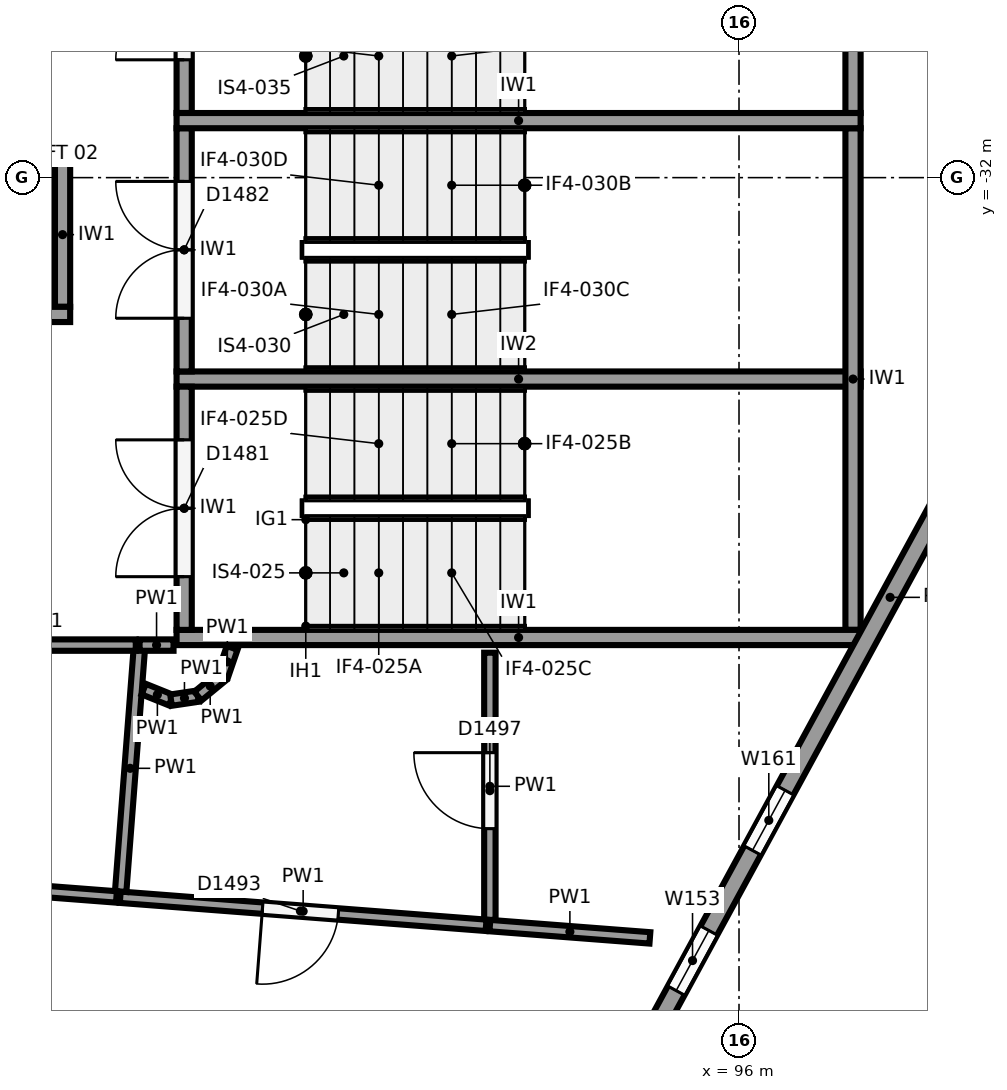
"""IFC4 building model, lengths in metres.
Left out: names, types, materials, properties, quantities, classifications, styles, units other than length and angle.
Written with IfcOpenShell. Run it as: python <this file> out.ifc"""

import sys

from ifc_helpers import new_model, si_unit, direction, frame, frame_2d, origin, place, context, subcontext, project, spatial, rectangle, extrude, element, fill, save


model = new_model("IFC4")
c1 = context("Model", 3, precision=1e-05, world=origin(), true_north=direction((0.0, 1.0)))
c2 = subcontext(c1, "Body", "Model", "MODEL_VIEW")
j1 = project(units=[si_unit("LENGTHUNIT", "METRE"), si_unit("PLANEANGLEUNIT", "RADIAN")], contexts=[c1])
p1 = place(None, origin())
s1 = spatial("IfcSite", under=j1, at=p1, CompositionType="ELEMENT")
p2 = place(p1, origin())
s2 = spatial("IfcBuilding", under=s1, at=p2, CompositionType="ELEMENT")
p3 = place(p2, frame((0.0, 0.0, 18.0)))
s3 = spatial("IfcBuildingStorey", under=s2, at=p3, CompositionType="ELEMENT", Elevation=18.0)
p4 = place(p3, frame((101.161, -31.689, 0.0), z_axis=(0.0, 0.0, 1.0), x_axis=(-0.477867771117, -0.878431780691, 0.0)))
e1 = element("IfcWall", 1, at=p4, inside=s3, PredefinedType="SOLIDWALL", context=c2, shape_type="SweptSolid", body=[
    extrude(rectangle(XDim=13.28, YDim=0.25, at=frame_2d((6.64, 0.0))), origin(), (0.0, 0.0, 1.0), 4.3),
])
p5 = place(p4, frame((11.63, 0.0, 1.0)))
e2 = element("IfcOpeningElement", 2, at=p5, cuts=e1, PredefinedType="OPENING", context=c2, shape_type="SweptSolid", body=[
    extrude(rectangle(XDim=0.9, YDim=3.25, at=frame_2d((0.45, 1.625))), frame((0.0, 0.135, 0.0), z_axis=(0.0, -1.0, 0.0), x_axis=(1.0, 0.0, 0.0)), (0.0, 0.0, 1.0), 0.27),
])
p6 = place(p4, frame((9.53, 0.0, 1.0)))
e3 = element("IfcOpeningElement", 3, at=p6, cuts=e1, PredefinedType="OPENING", context=c2, shape_type="SweptSolid", body=[
    extrude(rectangle(XDim=0.9, YDim=3.25, at=frame_2d((0.45, 1.625))), frame((0.0, 0.135, 0.0), z_axis=(0.0, -1.0, 0.0), x_axis=(1.0, 0.0, 0.0)), (0.0, 0.0, 1.0), 0.27),
])
p7 = place(p4, frame((1.13, 0.0, 1.0)))
e4 = element("IfcOpeningElement", 4, at=p7, cuts=e1, PredefinedType="OPENING", context=c2, shape_type="SweptSolid", body=[
    extrude(rectangle(XDim=0.9, YDim=3.25, at=frame_2d((0.45, 1.625))), frame((0.0, 0.135, 0.0), z_axis=(0.0, -1.0, 0.0), x_axis=(1.0, 0.0, 0.0)), (0.0, 0.0, 1.0), 0.27),
])
p8 = place(p3, frame((94.815, -19.145, 0.0), z_axis=(0.0, 0.0, 1.0), x_axis=(0.477867771117, -0.878431780691, 0.0)))
e5 = element("IfcWall", 5, at=p8, inside=s3, PredefinedType="SOLIDWALL", context=c2, shape_type="SweptSolid", body=[
    extrude(rectangle(XDim=13.28, YDim=0.25, at=frame_2d((6.64, 0.0))), origin(), (0.0, 0.0, 1.0), 4.3),
])
p9 = place(p8, frame((0.75, 0.0, 1.0)))
e6 = element("IfcOpeningElement", 6, at=p9, cuts=e5, PredefinedType="OPENING", context=c2, shape_type="SweptSolid", body=[
    extrude(rectangle(XDim=0.9, YDim=3.25, at=frame_2d((0.45, 1.625))), frame((0.0, 0.135, 0.0), z_axis=(0.0, -1.0, 0.0), x_axis=(1.0, 0.0, 0.0)), (0.0, 0.0, 1.0), 0.27),
])
p10 = place(p8, frame((2.85, 0.0, 1.0)))
e7 = element("IfcOpeningElement", 7, at=p10, cuts=e5, PredefinedType="OPENING", context=c2, shape_type="SweptSolid", body=[
    extrude(rectangle(XDim=0.9, YDim=3.25, at=frame_2d((0.45, 1.625))), frame((0.0, 0.135, 0.0), z_axis=(0.0, -1.0, 0.0), x_axis=(1.0, 0.0, 0.0)), (0.0, 0.0, 1.0), 0.27),
])
p11 = place(p8, frame((11.25, 0.0, 1.0)))
e8 = element("IfcOpeningElement", 8, at=p11, cuts=e5, PredefinedType="OPENING", context=c2, shape_type="SweptSolid", body=[
    extrude(rectangle(XDim=0.9, YDim=3.25, at=frame_2d((0.45, 1.625))), frame((0.0, 0.135, 0.0), z_axis=(0.0, -1.0, 0.0), x_axis=(1.0, 0.0, 0.0)), (0.0, 0.0, 1.0), 0.27),
])
for number, where, z_axis, x_axis in (
    (9, (97.6, -38.05, 0.0), (0.0, 0.0, 1.0), (-1.0, 0.0, 0.0)),
    (10, (97.6, -31.25, 0.0), (0.0, 0.0, 1.0), (-1.0, 0.0, 0.0)),
):
    element("IfcWall", number, at=place(p3, frame(where, z_axis=z_axis, x_axis=x_axis)), inside=s3, PredefinedType="SHEAR", context=c2, shape_type="SweptSolid", body=[
        extrude(rectangle(XDim=9.0, YDim=0.2, at=frame_2d((4.5, 0.0))), origin(), (0.0, 0.0, 1.0), 5.6),
    ])
for number, where, z_axis, x_axis in (
    (11, (97.5, -37.95, 0.0), (0.0, 0.0, 1.0), (0.0, 1.0, 0.0)),
    (12, (97.5, -31.15, 0.0), (0.0, 0.0, 1.0), (0.0, 1.0, 0.0)),
):
    element("IfcWall", number, at=place(p3, frame(where, z_axis=z_axis, x_axis=x_axis)), inside=s3, PredefinedType="SHEAR", context=c2, shape_type="SweptSolid", body=[
        extrude(rectangle(XDim=6.6, YDim=0.2, at=frame_2d((3.3, 0.0))), origin(), (0.0, 0.0, 1.0), 5.6),
    ])
p12 = place(p3, frame((97.6, -34.65, 0.0), z_axis=(0.0, 0.0, 1.0), x_axis=(-1.0, 0.0, 0.0)))
e13 = element("IfcWall", 13, at=p12, inside=s3, PredefinedType="SHEAR", context=c2, shape_type="SweptSolid", body=[
    extrude(rectangle(XDim=9.0, YDim=0.2, at=frame_2d((4.5, 0.0))), origin(), (0.0, 0.0, 1.0), 5.6),
])
p13 = place(p3, frame((88.7, -37.95, 0.0), z_axis=(0.0, 0.0, 1.0), x_axis=(0.0, 1.0, 0.0)))
e14 = element("IfcWall", 14, at=p13, inside=s3, PredefinedType="SHEAR", context=c2, shape_type="SweptSolid", body=[
    extrude(rectangle(XDim=3.2, YDim=0.2, at=frame_2d((1.6, 0.0))), origin(), (0.0, 0.0, 1.0), 5.6),
])
p14 = place(p13, frame((0.7, 0.0, 0.0)))
e15 = element("IfcOpeningElement", 15, at=p14, cuts=e14, PredefinedType="OPENING", context=c2, shape_type="SweptSolid", body=[
    extrude(rectangle(XDim=1.8, YDim=2.1, at=frame_2d((0.9, 1.05))), frame((0.0, 0.11, 0.0), z_axis=(0.0, -1.0, 0.0), x_axis=(1.0, 0.0, 0.0)), (0.0, 0.0, 1.0), 0.22),
])
p15 = place(p3, frame((88.7, -34.55, 0.0), z_axis=(0.0, 0.0, 1.0), x_axis=(0.0, 1.0, 0.0)))
e16 = element("IfcWall", 16, at=p15, inside=s3, PredefinedType="SHEAR", context=c2, shape_type="SweptSolid", body=[
    extrude(rectangle(XDim=3.2, YDim=0.2, at=frame_2d((1.6, 0.0))), origin(), (0.0, 0.0, 1.0), 5.6),
])
p16 = place(p15, frame((0.7, 0.0, 0.0)))
e17 = element("IfcOpeningElement", 17, at=p16, cuts=e16, PredefinedType="OPENING", context=c2, shape_type="SweptSolid", body=[
    extrude(rectangle(XDim=1.8, YDim=2.1, at=frame_2d((0.9, 1.05))), frame((0.0, 0.11, 0.0), z_axis=(0.0, -1.0, 0.0), x_axis=(1.0, 0.0, 0.0)), (0.0, 0.0, 1.0), 0.22),
])
p17 = place(p3, frame((88.7, -31.15, 0.0), z_axis=(0.0, 0.0, 1.0), x_axis=(0.0, 1.0, 0.0)))
e18 = element("IfcWall", 18, at=p17, inside=s3, PredefinedType="SHEAR", context=c2, shape_type="SweptSolid", body=[
    extrude(rectangle(XDim=3.2, YDim=0.2, at=frame_2d((1.6, 0.0))), origin(), (0.0, 0.0, 1.0), 5.6),
])
p18 = place(p17, frame((0.7, 0.0, 0.0)))
e19 = element("IfcOpeningElement", 19, at=p18, cuts=e18, PredefinedType="OPENING", context=c2, shape_type="SweptSolid", body=[
    extrude(rectangle(XDim=1.8, YDim=2.1, at=frame_2d((0.9, 1.05))), frame((0.0, 0.11, 0.0), z_axis=(0.0, -1.0, 0.0), x_axis=(1.0, 0.0, 0.0)), (0.0, 0.0, 1.0), 0.22),
])
for number, where, z_axis, x_axis in (
    (20, (87.2, -33.8, 0.0), (0.0, 0.0, 1.0), (-1.0, 0.0, 0.0)),
    (21, (87.2, -31.7, 0.0), (0.0, 0.0, 1.0), (-1.0, 0.0, 0.0)),
):
    element("IfcWall", number, at=place(p3, frame(where, z_axis=z_axis, x_axis=x_axis)), inside=s3, PredefinedType="SHEAR", context=c2, shape_type="SweptSolid", body=[
        extrude(rectangle(XDim=3.0, YDim=0.2, at=frame_2d((1.5, 0.0))), origin(), (0.0, 0.0, 1.0), 5.6),
    ])
p19 = place(p3, frame((87.1, -33.7, 0.0), z_axis=(0.0, 0.0, 1.0), x_axis=(0.0, 1.0, 0.0)))
e22 = element("IfcWall", 22, at=p19, inside=s3, PredefinedType="SHEAR", context=c2, shape_type="SweptSolid", body=[
    extrude(rectangle(XDim=1.9, YDim=0.2, at=frame_2d((0.95, 0.0))), origin(), (0.0, 0.0, 1.0), 5.6),
])
p20 = place(p3, frame((94.828, -42.002, 0.0), z_axis=(0.0, 0.0, 1.0), x_axis=(-0.997066714426, 0.076537356789, 0.0)))
e23 = element("IfcWall", 23, at=p20, inside=s3, PredefinedType="PARTITIONING", context=c2, shape_type="SweptSolid", body=[
    extrude(rectangle(XDim=2.112, YDim=0.15, at=frame_2d((1.056, 0.0))), origin(), (0.0, 0.0, 1.0), 5.6),
])
p21 = place(p3, frame((92.722, -41.765, 0.0), z_axis=(0.0, 0.0, 1.0), x_axis=(0.0, 1.0, 0.0)))
e24 = element("IfcWall", 24, at=p21, inside=s3, PredefinedType="PARTITIONING", context=c2, shape_type="SweptSolid", body=[
    extrude(rectangle(XDim=3.515, YDim=0.15, at=frame_2d((1.758, 0.0))), origin(), (0.0, 0.0, 1.0), 5.6),
])
p22 = place(p21, frame((1.2, 0.0, 0.0)))
e25 = element("IfcOpeningElement", 25, at=p22, cuts=e24, PredefinedType="OPENING", context=c2, shape_type="SweptSolid", body=[
    extrude(rectangle(XDim=1.0, YDim=2.1, at=frame_2d((0.5, 1.05))), frame((0.0, 0.085, 0.0), z_axis=(0.0, -1.0, 0.0), x_axis=(1.0, 0.0, 0.0)), (0.0, 0.0, 1.0), 0.17),
])
p23 = place(p3, frame((92.672, -41.837, 0.0), z_axis=(0.0, 0.0, 1.0), x_axis=(-0.997068154384, 0.07651859587, 0.0)))
e26 = element("IfcWall", 26, at=p23, inside=s3, PredefinedType="PARTITIONING", context=c2, shape_type="SweptSolid", body=[
    extrude(rectangle(XDim=4.827, YDim=0.15, at=frame_2d((2.414, 0.0))), origin(), (0.0, 0.0, 1.0), 5.6),
])
p24 = place(p23, frame((1.95, 0.0, 0.0)))
e27 = element("IfcOpeningElement", 27, at=p24, cuts=e26, PredefinedType="OPENING", context=c2, shape_type="SweptSolid", body=[
    extrude(rectangle(XDim=1.0, YDim=2.1, at=frame_2d((0.5, 1.05))), frame((0.0, 0.085, 0.0), z_axis=(0.0, -1.0, 0.0), x_axis=(1.0, 0.0, 0.0)), (0.0, 0.0, 1.0), 0.17),
])
p25 = place(p3, frame((87.865, -41.392, 0.0), z_axis=(0.0, 0.0, 1.0), x_axis=(0.076501302727, 0.997069481371, 0.0)))
e28 = element("IfcWall", 28, at=p25, inside=s3, PredefinedType="PARTITIONING", context=c2, shape_type="SweptSolid", body=[
    extrude(rectangle(XDim=3.252, YDim=0.15, at=frame_2d((1.626, 0.0))), origin(), (0.0, 0.0, 1.0), 5.6),
])
p26 = place(p3, frame((88.113, -38.15, 0.0), z_axis=(0.0, 0.0, 1.0), x_axis=(1.0, 0.0, 0.0)))
e29 = element("IfcWall", 29, at=p26, inside=s3, PredefinedType="PARTITIONING", context=c2, shape_type="SweptSolid", body=[
    extrude(rectangle(XDim=0.447, YDim=0.15, at=frame_2d((0.223, 0.0))), origin(), (0.0, 0.0, 1.0), 5.6),
])
p27 = place(p3, frame((87.809, -41.463, 0.0), z_axis=(0.0, 0.0, 1.0), x_axis=(-0.997068127428, 0.076518947109, 0.0)))
e30 = element("IfcWall", 30, at=p27, inside=s3, PredefinedType="PARTITIONING", context=c2, shape_type="SweptSolid", body=[
    extrude(rectangle(XDim=2.418, YDim=0.15, at=frame_2d((1.209, 0.0))), origin(), (0.0, 0.0, 1.0), 5.6),
])
p28 = place(p3, frame((85.577, -38.15, 0.0), z_axis=(0.0, 0.0, 1.0), x_axis=(1.0, 0.0, 0.0)))
e31 = element("IfcWall", 31, at=p28, inside=s3, PredefinedType="PARTITIONING", context=c2, shape_type="SweptSolid", body=[
    extrude(rectangle(XDim=2.486, YDim=0.15, at=frame_2d((1.243, 0.0))), origin(), (0.0, 0.0, 1.0), 5.6),
])
p29 = place(p3, frame((88.168, -38.729, 0.0), z_axis=(0.0, 0.0, 1.0), x_axis=(0.927779575936, -0.373128742496, 0.0)))
e32 = element("IfcWall", 32, at=p29, inside=s3, PredefinedType="PARTITIONING", context=c2, shape_type="SweptSolid", body=[
    extrude(rectangle(XDim=0.387, YDim=0.15, at=frame_2d((0.194, 0.0))), origin(), (0.0, 0.0, 1.0), 5.6),
])
p30 = place(p3, frame((88.527, -38.874, 0.0), z_axis=(0.0, 0.0, 1.0), x_axis=(0.989140978774, 0.146969806798, 0.0)))
e33 = element("IfcWall", 33, at=p30, inside=s3, PredefinedType="PARTITIONING", context=c2, shape_type="SweptSolid", body=[
    extrude(rectangle(XDim=0.357, YDim=0.15, at=frame_2d((0.179, 0.0))), origin(), (0.0, 0.0, 1.0), 5.6),
])
p31 = place(p3, frame((88.88, -38.822, 0.0), z_axis=(0.0, 0.0, 1.0), x_axis=(0.773256370555, 0.634093514709, 0.0)))
e34 = element("IfcWall", 34, at=p31, inside=s3, PredefinedType="PARTITIONING", context=c2, shape_type="SweptSolid", body=[
    extrude(rectangle(XDim=0.419, YDim=0.15, at=frame_2d((0.209, 0.0))), origin(), (0.0, 0.0, 1.0), 5.6),
])
p32 = place(p3, frame((89.205, -38.556, 0.0), z_axis=(0.0, 0.0, 1.0), x_axis=(0.325219597367, 0.945638521576, 0.0)))
e35 = element("IfcWall", 35, at=p32, inside=s3, PredefinedType="PARTITIONING", context=c2, shape_type="SweptSolid", body=[
    extrude(rectangle(XDim=0.39, YDim=0.15, at=frame_2d((0.195, 0.0))), origin(), (0.0, 0.0, 1.0), 5.6),
])
p33 = place(p5, origin())
e36 = element("IfcWindow", 36, at=p33, inside=s3, PartitioningType="SINGLE_PANEL", PredefinedType="WINDOW", context=c2, shape_type="SweptSolid", body=[
    extrude(rectangle(XDim=0.9, YDim=3.25, at=frame_2d((0.45, 1.625))), frame((0.0, 0.03, 0.0), z_axis=(0.0, -1.0, 0.0), x_axis=(1.0, 0.0, 0.0)), (0.0, 0.0, 1.0), 0.06),
])
fill(e2, e36)
p34 = place(p6, origin())
e37 = element("IfcWindow", 37, at=p34, inside=s3, PartitioningType="SINGLE_PANEL", PredefinedType="WINDOW", context=c2, shape_type="SweptSolid", body=[
    extrude(rectangle(XDim=0.9, YDim=3.25, at=frame_2d((0.45, 1.625))), frame((0.0, 0.03, 0.0), z_axis=(0.0, -1.0, 0.0), x_axis=(1.0, 0.0, 0.0)), (0.0, 0.0, 1.0), 0.06),
])
fill(e3, e37)
p35 = place(p14, origin())
e38 = element("IfcDoor", 38, at=p35, inside=s3, OperationType="DOUBLE_DOOR_SINGLE_SWING", PredefinedType="DOOR", context=c2, shape_type="SweptSolid", body=[
    extrude(rectangle(XDim=1.8, YDim=2.1, at=frame_2d((0.9, 1.05))), frame((0.0, 0.025, 0.0), z_axis=(0.0, -1.0, 0.0), x_axis=(1.0, 0.0, 0.0)), (0.0, 0.0, 1.0), 0.05),
])
fill(e15, e38)
p36 = place(p16, origin())
e39 = element("IfcDoor", 39, at=p36, inside=s3, OperationType="DOUBLE_DOOR_SINGLE_SWING", PredefinedType="DOOR", context=c2, shape_type="SweptSolid", body=[
    extrude(rectangle(XDim=1.8, YDim=2.1, at=frame_2d((0.9, 1.05))), frame((0.0, 0.025, 0.0), z_axis=(0.0, -1.0, 0.0), x_axis=(1.0, 0.0, 0.0)), (0.0, 0.0, 1.0), 0.05),
])
fill(e17, e39)
p37 = place(p18, origin())
e40 = element("IfcDoor", 40, at=p37, inside=s3, OperationType="DOUBLE_DOOR_SINGLE_SWING", PredefinedType="DOOR", context=c2, shape_type="SweptSolid", body=[
    extrude(rectangle(XDim=1.8, YDim=2.1, at=frame_2d((0.9, 1.05))), frame((0.0, 0.025, 0.0), z_axis=(0.0, -1.0, 0.0), x_axis=(1.0, 0.0, 0.0)), (0.0, 0.0, 1.0), 0.05),
])
fill(e19, e40)
p38 = place(p22, origin())
e41 = element("IfcDoor", 41, at=p38, inside=s3, OperationType="SINGLE_SWING_RIGHT", PredefinedType="DOOR", context=c2, shape_type="SweptSolid", body=[
    extrude(rectangle(XDim=1.0, YDim=2.1, at=frame_2d((0.5, 1.05))), frame((0.0, 0.025, 0.0), z_axis=(0.0, -1.0, 0.0), x_axis=(1.0, 0.0, 0.0)), (0.0, 0.0, 1.0), 0.05),
])
fill(e25, e41)
p39 = place(p24, origin())
e42 = element("IfcDoor", 42, at=p39, inside=s3, OperationType="SINGLE_SWING_RIGHT", PredefinedType="DOOR", context=c2, shape_type="SweptSolid", body=[
    extrude(rectangle(XDim=1.0, YDim=2.1, at=frame_2d((0.5, 1.05))), frame((0.0, 0.025, 0.0), z_axis=(0.0, -1.0, 0.0), x_axis=(1.0, 0.0, 0.0)), (0.0, 0.0, 1.0), 0.05),
])
fill(e27, e42)
save(model, sys.argv[1])
